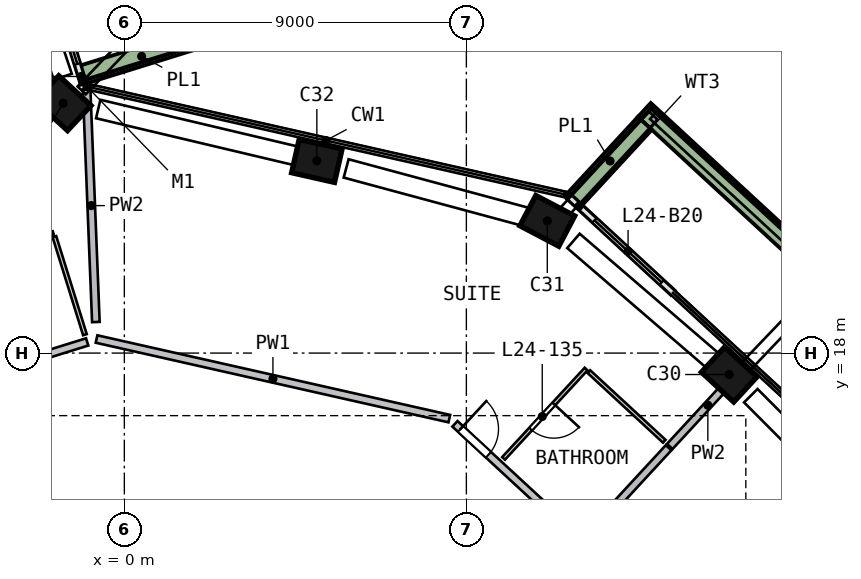
"""IFC4 building model, lengths in metres.
Left out: names, types, materials, properties, quantities, classifications, styles, units other than length and angle.
Written with IfcOpenShell. Run it as: python <this file> out.ifc"""

import sys

from ifc_helpers import new_model, si_unit, direction, frame, frame_2d, origin, origin_2d, place, context, subcontext, project, spatial, rectangle, extrude, element, fill, save


model = new_model("IFC4")
c1 = context("Model", 3, precision=1e-05, world=origin(), true_north=direction((0.0, 1.0)))
c2 = subcontext(c1, "Body", "Model", "MODEL_VIEW")
j1 = project(units=[si_unit("LENGTHUNIT", "METRE"), si_unit("PLANEANGLEUNIT", "RADIAN")], contexts=[c1])
p1 = place(None, origin())
s1 = spatial("IfcSite", under=j1, at=p1, CompositionType="ELEMENT")
p2 = place(p1, origin())
s2 = spatial("IfcBuilding", under=s1, at=p2, CompositionType="ELEMENT")
p3 = place(p2, frame((0.0, 0.0, 103.5)))
s3 = spatial("IfcBuildingStorey", under=s2, at=p3, CompositionType="ELEMENT", Elevation=103.5)
p4 = place(p3, frame((16.016, 17.344, 0.0), z_axis=(-0.083123025, 0.075517991, 0.993673787), x_axis=(-0.729776299, 0.674399767, -0.112300969)))
e1 = element("IfcColumn", 1, at=p4, inside=s3, PredefinedType="COLUMN", context=c2, shape_type="SweptSolid", body=[
    extrude(rectangle(XDim=1.15, YDim=0.9, at=origin_2d()), origin(), (0.0, 0.0, 1.0), 3.21),
])
p5 = place(p3, frame((11.253, 21.416, 0.0), z_axis=(-0.10225561, 0.052686348, 0.993361937), x_axis=(0.879147052, -0.462460096, 0.115026606)))
e2 = element("IfcColumn", 2, at=p5, inside=s3, PredefinedType="COLUMN", context=c2, shape_type="SweptSolid", body=[
    extrude(rectangle(XDim=1.15, YDim=0.9, at=origin_2d()), origin(), (0.0, 0.0, 1.0), 3.211),
])
p6 = place(p3, frame((5.198, 23.029, 0.0), z_axis=(-0.109740599, 0.023879798, 0.993673365), x_axis=(-0.969124304, 0.219512496, -0.112304706)))
e3 = element("IfcColumn", 3, at=p6, inside=s3, PredefinedType="COLUMN", context=c2, shape_type="SweptSolid", body=[
    extrude(rectangle(XDim=1.15, YDim=0.9, at=origin_2d()), origin(), (0.0, 0.0, 1.0), 3.21),
])
p7 = place(p3, frame((-1.469, 24.585, 0.0), z_axis=(-0.116899266, -0.007980769, 0.99311171), x_axis=(0.72770275, -0.681189593, 0.08018383)))
e4 = element("IfcColumn", 4, at=p7, inside=s3, PredefinedType="COLUMN", context=c2, shape_type="SweptSolid", body=[
    extrude(rectangle(XDim=1.15, YDim=0.9, at=origin_2d()), origin(), (0.0, 0.0, 1.0), 3.212),
])
p8 = place(p3, frame((-1.092, 25.139, 0.0), z_axis=(0.0, 0.0, 1.0), x_axis=(-0.297008689, 0.954874776, 0.0)))
e5 = element("IfcWall", 5, at=p8, inside=s3, PredefinedType="SOLIDWALL", context=c2, shape_type="SweptSolid", body=[
    extrude(rectangle(XDim=2.394, YDim=0.15, at=frame_2d((1.197, 0.0))), origin(), (0.0, 0.0, 1.0), 2.425),
])
p9 = place(p8, frame((0.494, 0.0, 0.0)))
e6 = element("IfcOpeningElement", 6, at=p9, cuts=e5, PredefinedType="OPENING", context=c2, shape_type="SweptSolid", body=[
    extrude(rectangle(XDim=1.5, YDim=2.4, at=frame_2d((0.75, 1.2))), frame((0.0, 0.085, 0.0), z_axis=(0.0, -1.0, 0.0), x_axis=(1.0, 0.0, 0.0)), (0.0, 0.0, 1.0), 0.17),
])
p10 = place(p3, frame((14.43, 19.592, 0.0), z_axis=(0.0, 0.0, 1.0), x_axis=(-0.734677294, 0.67841674, 0.0)))
e7 = element("IfcWall", 7, at=p10, inside=s3, PredefinedType="SOLIDWALL", context=c2, shape_type="SweptSolid", body=[
    extrude(rectangle(XDim=3.71, YDim=0.15, at=frame_2d((1.855, 0.0))), origin(), (0.0, 0.0, 1.0), 2.425),
])
p11 = place(p10, frame((0.4, 0.0, 0.0)))
e8 = element("IfcOpeningElement", 8, at=p11, cuts=e7, PredefinedType="OPENING", context=c2, shape_type="SweptSolid", body=[
    extrude(rectangle(XDim=2.4, YDim=2.4, at=frame_2d((1.2, 1.2))), frame((0.0, 0.085, 0.0), z_axis=(0.0, -1.0, 0.0), x_axis=(1.0, 0.0, 0.0)), (0.0, 0.0, 1.0), 0.17),
])
p12 = place(p3, frame((23.765, 15.089, 0.0), z_axis=(0.0, 0.0, 1.0), x_axis=(-0.734673161, 0.678421217, 0.0)))
e9 = element("IfcWall", 9, at=p12, inside=s3, PredefinedType="SOLIDWALL", context=c2, shape_type="SweptSolid", body=[
    extrude(rectangle(XDim=13.723, YDim=0.5, at=frame_2d((6.862, 0.0))), origin(), (0.0, 0.0, 1.0), 0.7),
])
p13 = place(p3, frame((13.697, 24.046, 0.0), z_axis=(0.0, 0.0, 1.0), x_axis=(-0.678415341, -0.734678586, 0.0)))
e10 = element("IfcWall", 10, at=p13, inside=s3, PredefinedType="SOLIDWALL", context=c2, shape_type="SweptSolid", body=[
    extrude(rectangle(XDim=2.699, YDim=0.5, at=frame_2d((1.35, 0.0))), origin(), (0.0, 0.0, 1.0), 0.7),
])
p14 = place(p3, frame((-1.073, 25.333, 0.0), z_axis=(0.0, 0.0, 1.0), x_axis=(0.954870245, 0.297023257, 0.0)))
e11 = element("IfcWall", 11, at=p14, inside=s3, PredefinedType="SOLIDWALL", context=c2, shape_type="SweptSolid", body=[
    extrude(rectangle(XDim=3.199, YDim=0.5, at=frame_2d((1.6, 0.0))), origin(), (0.0, 0.0, 1.0), 0.7),
])
p15 = place(p3, frame((-0.978, 18.293, 0.0), z_axis=(0.0, 0.0, 1.0), x_axis=(-0.954859945, -0.297056369, 0.0)))
e12 = element("IfcWall", 12, at=p15, inside=s3, PredefinedType="SOLIDWALL", context=c2, shape_type="SweptSolid", body=[
    extrude(rectangle(XDim=3.4, YDim=0.2, at=frame_2d((1.7, 0.0))), origin(), (0.0, 0.0, 1.0), 3.19),
])
p16 = place(p3, frame((8.551, 16.275, 0.0), z_axis=(0.0, 0.0, 1.0), x_axis=(-0.975460913, 0.220172678, 0.0)))
e13 = element("IfcWall", 13, at=p16, inside=s3, PredefinedType="SOLIDWALL", context=c2, shape_type="SweptSolid", body=[
    extrude(rectangle(XDim=9.516, YDim=0.2, at=frame_2d((4.758, 0.0))), origin(), (0.0, 0.0, 1.0), 3.19),
])
p17 = place(p3, frame((8.699, 16.139, 0.0), z_axis=(0.0, 0.0, 1.0), x_axis=(0.734682268, -0.678411354, 0.0)))
e14 = element("IfcWall", 14, at=p17, inside=s3, PredefinedType="SOLIDWALL", context=c2, shape_type="SweptSolid", body=[
    extrude(rectangle(XDim=9.115, YDim=0.2, at=frame_2d((4.558, 0.0))), origin(), (0.0, 0.0, 1.0), 3.19),
])
p18 = place(p17, frame((0.2, 0.0, 0.0)))
e15 = element("IfcOpeningElement", 15, at=p18, cuts=e14, PredefinedType="OPENING", context=c2, shape_type="SweptSolid", body=[
    extrude(rectangle(XDim=1.0, YDim=2.1, at=frame_2d((0.5, 1.05))), frame((0.0, 0.11, 0.0), z_axis=(0.0, -1.0, 0.0), x_axis=(1.0, 0.0, 0.0)), (0.0, 0.0, 1.0), 0.22),
])
p19 = place(p3, frame((-0.993, 24.944, 0.0), z_axis=(0.0, 0.0, 1.0), x_axis=(0.039774056, -0.999208699, 0.0)))
e16 = element("IfcWall", 16, at=p19, inside=s3, PredefinedType="SOLIDWALL", context=c2, shape_type="SweptSolid", body=[
    extrude(rectangle(XDim=6.132, YDim=0.2, at=frame_2d((3.066, 0.0))), origin(), (0.0, 0.0, 1.0), 3.19),
])
p20 = place(p3, frame((12.351, 13.375, 0.0), z_axis=(0.0, 0.0, 1.0), x_axis=(0.678388316, 0.73470354, 0.0)))
e17 = element("IfcWall", 17, at=p20, inside=s3, PredefinedType="SOLIDWALL", context=c2, shape_type="SweptSolid", body=[
    extrude(rectangle(XDim=2.905, YDim=0.2, at=frame_2d((1.452, 0.0))), origin(), (0.0, 0.0, 1.0), 3.19),
])
p21 = place(p3, frame((14.353, 15.543, 0.0), z_axis=(0.0, 0.0, 1.0), x_axis=(0.678427795, 0.734667086, 0.0)))
e18 = element("IfcWall", 18, at=p21, inside=s3, PredefinedType="SOLIDWALL", context=c2, shape_type="SweptSolid", body=[
    extrude(rectangle(XDim=2.952, YDim=0.2, at=frame_2d((1.476, 0.0))), origin(), (0.0, 0.0, 1.0), 3.19),
])
p22 = place(p3, frame((-1.869, 21.158, 0.0), z_axis=(0.0, 0.0, 1.0), x_axis=(-0.954853891, -0.297075827, 0.0)))
e19 = element("IfcWall", 19, at=p22, inside=s3, PredefinedType="PARTITIONING", context=c2, shape_type="SweptSolid", body=[
    extrude(rectangle(XDim=3.2, YDim=0.1, at=frame_2d((1.6, 0.0))), origin(), (0.0, 0.0, 1.0), 3.19),
])
p23 = place(p22, frame((1.25, 0.0, 0.0)))
e20 = element("IfcOpeningElement", 20, at=p23, cuts=e19, PredefinedType="OPENING", context=c2, shape_type="SweptSolid", body=[
    extrude(rectangle(XDim=0.9, YDim=2.1, at=frame_2d((0.45, 1.05))), frame((0.0, 0.06, 0.0), z_axis=(0.0, -1.0, 0.0), x_axis=(1.0, 0.0, 0.0)), (0.0, 0.0, 1.0), 0.12),
])
p24 = place(p3, frame((-1.038, 18.485, 0.0), z_axis=(0.0, 0.0, 1.0), x_axis=(-0.29706472, 0.954857346, 0.0)))
e21 = element("IfcWall", 21, at=p24, inside=s3, PredefinedType="PARTITIONING", context=c2, shape_type="SweptSolid", body=[
    extrude(rectangle(XDim=2.7, YDim=0.1, at=frame_2d((1.35, 0.0))), origin(), (0.0, 0.0, 1.0), 3.19),
])
p25 = place(p3, frame((12.15, 17.58, 0.0), z_axis=(0.0, 0.0, 1.0), x_axis=(-0.678394168, -0.734698137, 0.0)))
e22 = element("IfcWall", 22, at=p25, inside=s3, PredefinedType="PARTITIONING", context=c2, shape_type="SweptSolid", body=[
    extrude(rectangle(XDim=3.2, YDim=0.1, at=frame_2d((1.6, 0.0))), origin(), (0.0, 0.0, 1.0), 3.19),
])
p26 = place(p25, frame((1.25, 0.0, 0.0)))
e23 = element("IfcOpeningElement", 23, at=p26, cuts=e22, PredefinedType="OPENING", context=c2, shape_type="SweptSolid", body=[
    extrude(rectangle(XDim=0.9, YDim=2.1, at=frame_2d((0.45, 1.05))), frame((0.0, 0.06, 0.0), z_axis=(0.0, -1.0, 0.0), x_axis=(1.0, 0.0, 0.0)), (0.0, 0.0, 1.0), 0.12),
])
p27 = place(p3, frame((12.224, 17.512, 0.0), z_axis=(0.0, 0.0, 1.0), x_axis=(0.734668232, -0.678426553, 0.0)))
e24 = element("IfcWall", 24, at=p27, inside=s3, PredefinedType="PARTITIONING", context=c2, shape_type="SweptSolid", body=[
    extrude(rectangle(XDim=2.7, YDim=0.1, at=frame_2d((1.35, 0.0))), origin(), (0.0, 0.0, 1.0), 3.19),
])
p28 = place(p9, origin())
e25 = element("IfcDoor", 25, at=p28, inside=s3, OperationType="SLIDING_TO_LEFT", PredefinedType="DOOR", context=c2, shape_type="SweptSolid", body=[
    extrude(rectangle(XDim=1.5, YDim=2.4, at=frame_2d((0.75, 1.2))), frame((0.0, 0.025, 0.0), z_axis=(0.0, -1.0, 0.0), x_axis=(1.0, 0.0, 0.0)), (0.0, 0.0, 1.0), 0.05),
])
fill(e6, e25)
p29 = place(p11, origin())
e26 = element("IfcDoor", 26, at=p29, inside=s3, OperationType="SLIDING_TO_RIGHT", PredefinedType="DOOR", context=c2, shape_type="SweptSolid", body=[
    extrude(rectangle(XDim=2.4, YDim=2.4, at=frame_2d((1.2, 1.2))), frame((0.0, 0.025, 0.0), z_axis=(0.0, -1.0, 0.0), x_axis=(1.0, 0.0, 0.0)), (0.0, 0.0, 1.0), 0.05),
])
fill(e8, e26)
p30 = place(p18, origin())
e27 = element("IfcDoor", 27, at=p30, inside=s3, OperationType="SINGLE_SWING_LEFT", PredefinedType="DOOR", context=c2, shape_type="SweptSolid", body=[
    extrude(rectangle(XDim=1.0, YDim=2.1, at=frame_2d((0.5, 1.05))), frame((0.0, 0.025, 0.0), z_axis=(0.0, -1.0, 0.0), x_axis=(1.0, 0.0, 0.0)), (0.0, 0.0, 1.0), 0.05),
])
fill(e15, e27)
p31 = place(p26, origin())
e28 = element("IfcDoor", 28, at=p31, inside=s3, OperationType="SINGLE_SWING_LEFT", PredefinedType="DOOR", context=c2, shape_type="SweptSolid", body=[
    extrude(rectangle(XDim=0.9, YDim=2.1, at=frame_2d((0.45, 1.05))), frame((0.0, 0.025, 0.0), z_axis=(0.0, -1.0, 0.0), x_axis=(1.0, 0.0, 0.0)), (0.0, 0.0, 1.0), 0.05),
])
fill(e23, e28)
save(model, sys.argv[1])
